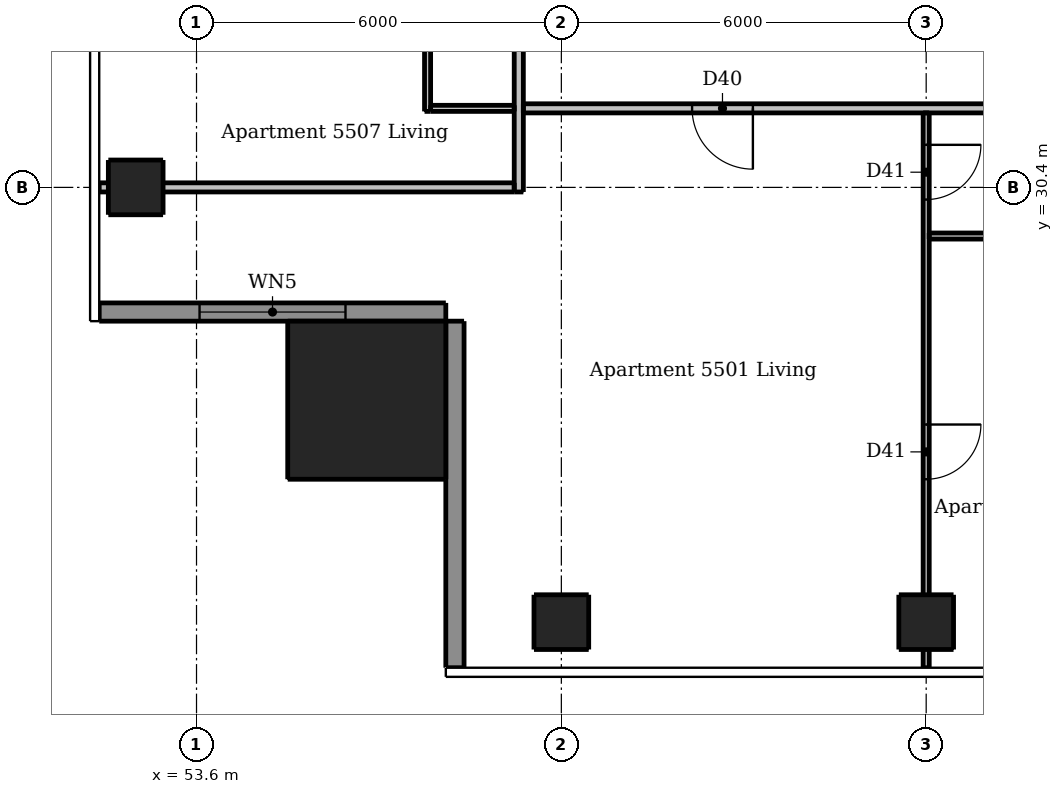
"""IFC4 building model, lengths in metres.
Left out: names, types, materials, properties, quantities, classifications, styles, units other than length and angle.
Written with IfcOpenShell. Run it as: python <this file> out.ifc"""

import sys

from ifc_helpers import new_model, si_unit, direction, frame, frame_2d, origin, origin_2d, place, context, subcontext, project, spatial, rectangle, extrude, element, fill, save


model = new_model("IFC4")
c1 = context("Model", 3, precision=1e-05, world=origin(), true_north=direction((0.0, 1.0)))
c2 = subcontext(c1, "Body", "Model", "MODEL_VIEW")
j1 = project(units=[si_unit("LENGTHUNIT", "METRE"), si_unit("PLANEANGLEUNIT", "RADIAN")], contexts=[c1])
p1 = place(None, origin())
s1 = spatial("IfcSite", under=j1, at=p1, CompositionType="ELEMENT")
p2 = place(p1, origin())
s2 = spatial("IfcBuilding", under=s1, at=p2, CompositionType="ELEMENT")
p3 = place(p2, frame((0.0, 0.0, 206.8)))
s3 = spatial("IfcBuildingStorey", under=s2, at=p3, CompositionType="ELEMENT", Elevation=206.8)
for number, where, z_axis, x_axis in (
    (1, (59.6, 23.25, 0.0), (0.0, 0.0, 1.0), (1.0, 0.0, 0.0)),
    (2, (65.6, 23.25, 0.0), (0.0, 0.0, 1.0), (1.0, 0.0, 0.0)),
    (3, (52.6, 30.4, 0.0), (0.0, 0.0, 1.0), (1.0, 0.0, 0.0)),
):
    element("IfcColumn", number, at=place(p3, frame(where, z_axis=z_axis, x_axis=x_axis)), inside=s3, PredefinedType="COLUMN", context=c2, shape_type="SweptSolid", body=[
        extrude(rectangle(XDim=0.9, YDim=0.9, at=origin_2d()), origin(), (0.0, 0.0, 1.0), 3.05),
    ])
p4 = place(p3, frame((56.4, 26.9, 0.0), z_axis=(0.0, 0.0, 1.0), x_axis=(1.0, 0.0, 0.0)))
e4 = element("IfcColumn", 4, at=p4, inside=s3, PredefinedType="COLUMN", context=c2, shape_type="SweptSolid", body=[
    extrude(rectangle(XDim=2.6, YDim=2.6, at=origin_2d()), origin(), (0.0, 0.0, 1.0), 3.3),
])
p5 = place(p3, frame((52.0, 28.35, 0.0), z_axis=(0.0, 0.0, 1.0), x_axis=(1.0, 0.0, 0.0)))
e5 = element("IfcWall", 5, at=p5, inside=s3, PredefinedType="SOLIDWALL", context=c2, shape_type="SweptSolid", body=[
    extrude(rectangle(XDim=5.7, YDim=0.3, at=frame_2d((2.85, 0.0))), origin(), (0.0, 0.0, 1.0), 3.05),
])
p6 = place(p5, frame((1.65, 0.0, 0.15)))
e6 = element("IfcOpeningElement", 6, at=p6, cuts=e5, PredefinedType="OPENING", context=c2, shape_type="SweptSolid", body=[
    extrude(rectangle(XDim=2.4, YDim=2.1, at=frame_2d((1.2, 1.05))), frame((0.0, 0.16, 0.0), z_axis=(0.0, -1.0, 0.0), x_axis=(1.0, 0.0, 0.0)), (0.0, 0.0, 1.0), 0.32),
])
p7 = place(p3, frame((57.85, 28.2, 0.0), z_axis=(0.0, 0.0, 1.0), x_axis=(0.0, -1.0, 0.0)))
e7 = element("IfcWall", 7, at=p7, inside=s3, PredefinedType="SOLIDWALL", context=c2, shape_type="SweptSolid", body=[
    extrude(rectangle(XDim=5.7, YDim=0.3, at=frame_2d((2.85, 0.0))), origin(), (0.0, 0.0, 1.0), 3.05),
])
p8 = place(p3, frame((57.4, 31.65, 0.0), z_axis=(0.0, 0.0, 1.0), x_axis=(0.0, 1.0, 0.0)))
e8 = element("IfcWall", 8, at=p8, inside=s3, PredefinedType="PARTITIONING", context=c2, shape_type="SweptSolid", body=[
    extrude(rectangle(XDim=16.675, YDim=0.1, at=frame_2d((8.337, 0.0))), origin(), (0.0, 0.0, 1.0), 3.05),
])
p9 = place(p8, frame((3.45, 0.0, 0.0)))
e9 = element("IfcOpeningElement", 9, at=p9, cuts=e8, PredefinedType="OPENING", context=c2, shape_type="SweptSolid", body=[
    extrude(rectangle(XDim=0.9, YDim=2.1, at=frame_2d((0.45, 1.05))), frame((0.0, 0.06, 0.0), z_axis=(0.0, -1.0, 0.0), x_axis=(1.0, 0.0, 0.0)), (0.0, 0.0, 1.0), 0.12),
])
p10 = place(p8, frame((8.8, 0.0, 0.0)))
e10 = element("IfcOpeningElement", 10, at=p10, cuts=e8, PredefinedType="OPENING", context=c2, shape_type="SweptSolid", body=[
    extrude(rectangle(XDim=0.9, YDim=2.1, at=frame_2d((0.45, 1.05))), frame((0.0, 0.06, 0.0), z_axis=(0.0, -1.0, 0.0), x_axis=(1.0, 0.0, 0.0)), (0.0, 0.0, 1.0), 0.12),
])
p11 = place(p8, frame((14.5, 0.0, 0.0)))
e11 = element("IfcOpeningElement", 11, at=p11, cuts=e8, PredefinedType="OPENING", context=c2, shape_type="SweptSolid", body=[
    extrude(rectangle(XDim=0.9, YDim=2.1, at=frame_2d((0.45, 1.05))), frame((0.0, 0.06, 0.0), z_axis=(0.0, -1.0, 0.0), x_axis=(1.0, 0.0, 0.0)), (0.0, 0.0, 1.0), 0.12),
])
p12 = place(p8, frame((11.55, 0.0, 0.0)))
e12 = element("IfcOpeningElement", 12, at=p12, cuts=e8, PredefinedType="OPENING", context=c2, shape_type="SweptSolid", body=[
    extrude(rectangle(XDim=0.8, YDim=2.1, at=frame_2d((0.4, 1.05))), frame((0.0, 0.06, 0.0), z_axis=(0.0, -1.0, 0.0), x_axis=(1.0, 0.0, 0.0)), (0.0, 0.0, 1.0), 0.12),
])
p13 = place(p3, frame((65.6, 31.625, 0.0), z_axis=(0.0, 0.0, 1.0), x_axis=(0.0, -1.0, 0.0)))
e13 = element("IfcWall", 13, at=p13, inside=s3, PredefinedType="PARTITIONING", context=c2, shape_type="SweptSolid", body=[
    extrude(rectangle(XDim=9.125, YDim=0.1, at=frame_2d((4.562, 0.0))), origin(), (0.0, 0.0, 1.0), 2.516),
])
p14 = place(p13, frame((0.525, 0.0, 0.0)))
e14 = element("IfcOpeningElement", 14, at=p14, cuts=e13, PredefinedType="OPENING", context=c2, shape_type="SweptSolid", body=[
    extrude(rectangle(XDim=0.9, YDim=2.1, at=frame_2d((0.45, 1.05))), frame((0.0, 0.06, 0.0), z_axis=(0.0, -1.0, 0.0), x_axis=(1.0, 0.0, 0.0)), (0.0, 0.0, 1.0), 0.12),
])
p15 = place(p13, frame((5.125, 0.0, 0.0)))
e15 = element("IfcOpeningElement", 15, at=p15, cuts=e13, PredefinedType="OPENING", context=c2, shape_type="SweptSolid", body=[
    extrude(rectangle(XDim=0.9, YDim=2.1, at=frame_2d((0.45, 1.05))), frame((0.0, 0.06, 0.0), z_axis=(0.0, -1.0, 0.0), x_axis=(1.0, 0.0, 0.0)), (0.0, 0.0, 1.0), 0.12),
])
p16 = place(p3, frame((57.45, 31.7, 0.0), z_axis=(0.0, 0.0, 1.0), x_axis=(1.0, 0.0, 0.0)))
e16 = element("IfcWall", 16, at=p16, inside=s3, PredefinedType="PARTITIONING", context=c2, shape_type="SweptSolid", body=[
    extrude(rectangle(XDim=1.375, YDim=0.1, at=frame_2d((0.688, 0.0))), origin(), (0.0, 0.0, 1.0), 3.05),
])
p17 = place(p3, frame((65.65, 29.6, 0.0), z_axis=(0.0, 0.0, 1.0), x_axis=(1.0, 0.0, 0.0)))
e17 = element("IfcWall", 17, at=p17, inside=s3, PredefinedType="PARTITIONING", context=c2, shape_type="SweptSolid", body=[
    extrude(rectangle(XDim=5.875, YDim=0.1, at=frame_2d((2.938, 0.0))), origin(), (0.0, 0.0, 1.0), 3.05),
])
p18 = place(p17, frame((3.75, 0.0, 0.0)))
e18 = element("IfcOpeningElement", 18, at=p18, cuts=e17, PredefinedType="OPENING", context=c2, shape_type="SweptSolid", body=[
    extrude(rectangle(XDim=0.8, YDim=2.1, at=frame_2d((0.4, 1.05))), frame((0.0, 0.06, 0.0), z_axis=(0.0, -1.0, 0.0), x_axis=(1.0, 0.0, 0.0)), (0.0, 0.0, 1.0), 0.12),
])
p19 = place(p3, frame((58.9, 30.325, 0.0), z_axis=(0.0, 0.0, 1.0), x_axis=(0.0, 1.0, 0.0)))
e19 = element("IfcWall", 19, at=p19, inside=s3, PredefinedType="PARTITIONING", context=c2, shape_type="SweptSolid", body=[
    extrude(rectangle(XDim=30.85, YDim=0.15, at=frame_2d((15.425, 0.0))), origin(), (0.0, 0.0, 1.0), 3.05),
])
p20 = place(p19, frame((9.225, 0.0, 0.0)))
e20 = element("IfcOpeningElement", 20, at=p20, cuts=e19, PredefinedType="OPENING", context=c2, shape_type="SweptSolid", body=[
    extrude(rectangle(XDim=1.0, YDim=2.1, at=frame_2d((0.5, 1.05))), frame((0.0, 0.085, 0.0), z_axis=(0.0, -1.0, 0.0), x_axis=(1.0, 0.0, 0.0)), (0.0, 0.0, 1.0), 0.17),
])
p21 = place(p19, frame((26.925, 0.0, 0.0)))
e21 = element("IfcOpeningElement", 21, at=p21, cuts=e19, PredefinedType="OPENING", context=c2, shape_type="SweptSolid", body=[
    extrude(rectangle(XDim=1.0, YDim=2.1, at=frame_2d((0.5, 1.05))), frame((0.0, 0.085, 0.0), z_axis=(0.0, -1.0, 0.0), x_axis=(1.0, 0.0, 0.0)), (0.0, 0.0, 1.0), 0.17),
])
p22 = place(p3, frame((89.525, 31.7, 0.0), z_axis=(0.0, 0.0, 1.0), x_axis=(-1.0, 0.0, 0.0)))
e22 = element("IfcWall", 22, at=p22, inside=s3, PredefinedType="PARTITIONING", context=c2, shape_type="SweptSolid", body=[
    extrude(rectangle(XDim=30.55, YDim=0.15, at=frame_2d((15.275, 0.0))), origin(), (0.0, 0.0, 1.0), 3.05),
])
p23 = place(p22, frame((26.775, 0.0, 0.0)))
e23 = element("IfcOpeningElement", 23, at=p23, cuts=e22, PredefinedType="OPENING", context=c2, shape_type="SweptSolid", body=[
    extrude(rectangle(XDim=1.0, YDim=2.1, at=frame_2d((0.5, 1.05))), frame((0.0, 0.085, 0.0), z_axis=(0.0, -1.0, 0.0), x_axis=(1.0, 0.0, 0.0)), (0.0, 0.0, 1.0), 0.17),
])
p24 = place(p22, frame((9.075, 0.0, 0.0)))
e24 = element("IfcOpeningElement", 24, at=p24, cuts=e22, PredefinedType="OPENING", context=c2, shape_type="SweptSolid", body=[
    extrude(rectangle(XDim=1.0, YDim=2.1, at=frame_2d((0.5, 1.05))), frame((0.0, 0.085, 0.0), z_axis=(0.0, -1.0, 0.0), x_axis=(1.0, 0.0, 0.0)), (0.0, 0.0, 1.0), 0.17),
])
p25 = place(p3, frame((52.0, 30.4, 0.0), z_axis=(0.0, 0.0, 1.0), x_axis=(1.0, 0.0, 0.0)))
e25 = element("IfcWall", 25, at=p25, inside=s3, PredefinedType="PARTITIONING", context=c2, shape_type="SweptSolid", body=[
    extrude(rectangle(XDim=6.825, YDim=0.15, at=frame_2d((3.413, 0.0))), origin(), (0.0, 0.0, 1.0), 2.647),
])
p26 = place(p6, origin())
e26 = element("IfcWindow", 26, at=p26, inside=s3, PartitioningType="DOUBLE_PANEL_VERTICAL", PredefinedType="WINDOW", context=c2, shape_type="SweptSolid", body=[
    extrude(rectangle(XDim=2.4, YDim=2.1, at=frame_2d((1.2, 1.05))), frame((0.0, 0.03, 0.0), z_axis=(0.0, -1.0, 0.0), x_axis=(1.0, 0.0, 0.0)), (0.0, 0.0, 1.0), 0.06),
])
fill(e6, e26)
p27 = place(p23, origin())
e27 = element("IfcDoor", 27, at=p27, inside=s3, OperationType="SINGLE_SWING_LEFT", PredefinedType="DOOR", context=c2, shape_type="SweptSolid", body=[
    extrude(rectangle(XDim=1.0, YDim=2.1, at=frame_2d((0.5, 1.05))), frame((0.0, 0.025, 0.0), z_axis=(0.0, -1.0, 0.0), x_axis=(1.0, 0.0, 0.0)), (0.0, 0.0, 1.0), 0.05),
])
fill(e23, e27)
p28 = place(p14, origin())
e28 = element("IfcDoor", 28, at=p28, inside=s3, OperationType="SINGLE_SWING_LEFT", PredefinedType="DOOR", context=c2, shape_type="SweptSolid", body=[
    extrude(rectangle(XDim=0.9, YDim=2.1, at=frame_2d((0.45, 1.05))), frame((0.0, 0.025, 0.0), z_axis=(0.0, -1.0, 0.0), x_axis=(1.0, 0.0, 0.0)), (0.0, 0.0, 1.0), 0.05),
])
fill(e14, e28)
p29 = place(p15, origin())
e29 = element("IfcDoor", 29, at=p29, inside=s3, OperationType="SINGLE_SWING_LEFT", PredefinedType="DOOR", context=c2, shape_type="SweptSolid", body=[
    extrude(rectangle(XDim=0.9, YDim=2.1, at=frame_2d((0.45, 1.05))), frame((0.0, 0.025, 0.0), z_axis=(0.0, -1.0, 0.0), x_axis=(1.0, 0.0, 0.0)), (0.0, 0.0, 1.0), 0.05),
])
fill(e15, e29)
save(model, sys.argv[1])
